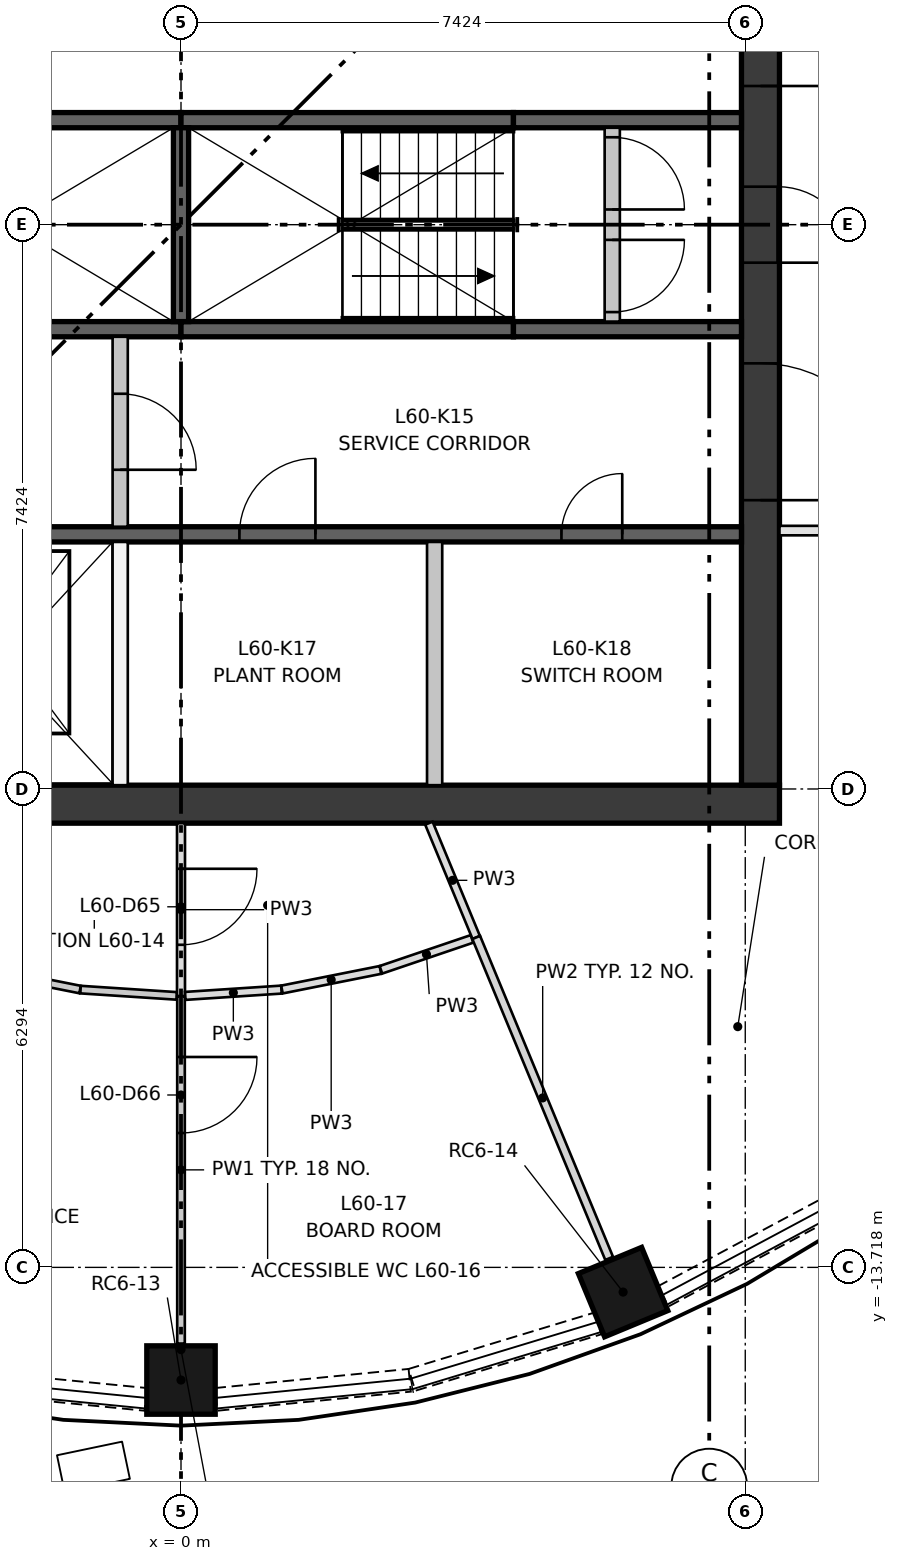
"""IFC4 building model, lengths in metres.
Left out: names, types, materials, properties, quantities, classifications, styles, units other than length and angle.
Written with IfcOpenShell. Run it as: python <this file> out.ifc"""

import sys

from ifc_helpers import new_model, si_unit, direction, frame, frame_2d, origin, origin_2d, place, context, subcontext, project, spatial, rectangle, extrude, element, fill, save


model = new_model("IFC4")
c1 = context("Model", 3, precision=1e-05, world=origin(), true_north=direction((0.0, 1.0)))
c2 = subcontext(c1, "Body", "Model", "MODEL_VIEW")
j1 = project(units=[si_unit("LENGTHUNIT", "METRE"), si_unit("PLANEANGLEUNIT", "RADIAN")], contexts=[c1])
p1 = place(None, origin())
s1 = spatial("IfcSite", under=j1, at=p1, CompositionType="ELEMENT")
p2 = place(p1, origin())
s2 = spatial("IfcBuilding", under=s1, at=p2, CompositionType="ELEMENT")
p3 = place(p2, frame((0.0, 0.0, 221.15)))
s3 = spatial("IfcBuildingStorey", under=s2, at=p3, CompositionType="ELEMENT", Elevation=221.15)
for number, where, z_axis, x_axis in (
    (1, (0.0, -15.2, 0.0), (0.0, 0.0, 1.0), (0.0, -1.0, 0.0)),
    (2, (5.817, -14.043, 0.0), (0.0, 0.0, 1.0), (0.383, -0.924, 0.0)),
):
    element("IfcColumn", number, at=place(p3, frame(where, z_axis=z_axis, x_axis=x_axis)), inside=s3, PredefinedType="COLUMN", context=c2, shape_type="SweptSolid", body=[
        extrude(rectangle(XDim=0.9, YDim=0.9, at=origin_2d()), origin(), (0.0, 0.0, 1.0), 2.85),
    ])
p4 = place(p3, frame((-7.874, -7.624, 0.0), z_axis=(0.0, 0.0, 1.0), x_axis=(1.0, 0.0, 0.0)))
e3 = element("IfcWall", 3, at=p4, inside=s3, PredefinedType="SHEAR", context=c2, shape_type="SweptSolid", body=[
    extrude(rectangle(XDim=15.748, YDim=0.5, at=frame_2d((7.874, 0.0))), origin(), (0.0, 0.0, 1.0), 3.35),
])
p5 = place(p3, frame((7.624, -7.374, 0.0), z_axis=(0.0, 0.0, 1.0), x_axis=(0.0, 1.0, 0.0)))
e4 = element("IfcWall", 4, at=p5, inside=s3, PredefinedType="SHEAR", context=c2, shape_type="SweptSolid", body=[
    extrude(rectangle(XDim=14.748, YDim=0.5, at=frame_2d((7.374, 0.0))), origin(), (0.0, 0.0, 1.0), 3.35),
])
p6 = place(p5, frame((6.874, 0.0, 0.0)))
e5 = element("IfcOpeningElement", 5, at=p6, cuts=e4, PredefinedType="OPENING", context=c2, shape_type="SweptSolid", body=[
    extrude(rectangle(XDim=1.0, YDim=2.1, at=frame_2d((0.5, 1.05))), frame((0.0, 0.26, 0.0), z_axis=(0.0, -1.0, 0.0), x_axis=(1.0, 0.0, 0.0)), (0.0, 0.0, 1.0), 0.52),
])
p7 = place(p5, frame((3.75, 0.0, 0.0)))
e6 = element("IfcOpeningElement", 6, at=p7, cuts=e4, PredefinedType="OPENING", context=c2, shape_type="SweptSolid", body=[
    extrude(rectangle(XDim=1.8, YDim=2.1, at=frame_2d((0.9, 1.05))), frame((0.0, 0.26, 0.0), z_axis=(0.0, -1.0, 0.0), x_axis=(1.0, 0.0, 0.0)), (0.0, 0.0, 1.0), 0.52),
])
p8 = place(p5, frame((9.198, 0.0, 0.0)))
e7 = element("IfcOpeningElement", 7, at=p8, cuts=e4, PredefinedType="OPENING", context=c2, shape_type="SweptSolid", body=[
    extrude(rectangle(XDim=1.8, YDim=2.1, at=frame_2d((0.9, 1.05))), frame((0.0, 0.26, 0.0), z_axis=(0.0, -1.0, 0.0), x_axis=(1.0, 0.0, 0.0)), (0.0, 0.0, 1.0), 0.52),
])
p9 = place(p3, frame((-7.374, -4.074, 0.0), z_axis=(0.0, 0.0, 1.0), x_axis=(1.0, 0.0, 0.0)))
e8 = element("IfcWall", 8, at=p9, inside=s3, PredefinedType="SHEAR", context=c2, shape_type="SweptSolid", body=[
    extrude(rectangle(XDim=14.748, YDim=0.2, at=frame_2d((7.374, 0.0))), origin(), (0.0, 0.0, 1.0), 3.0),
])
p10 = place(p9, frame((1.319, 0.0, 0.0)))
e9 = element("IfcOpeningElement", 9, at=p10, cuts=e8, PredefinedType="OPENING", context=c2, shape_type="SweptSolid", body=[
    extrude(rectangle(XDim=1.1, YDim=2.1, at=frame_2d((0.55, 1.05))), frame((0.0, 0.11, 0.0), z_axis=(0.0, -1.0, 0.0), x_axis=(1.0, 0.0, 0.0)), (0.0, 0.0, 1.0), 0.22),
])
p11 = place(p9, frame((4.456, 0.0, 0.0)))
e10 = element("IfcOpeningElement", 10, at=p11, cuts=e8, PredefinedType="OPENING", context=c2, shape_type="SweptSolid", body=[
    extrude(rectangle(XDim=1.1, YDim=2.1, at=frame_2d((0.55, 1.05))), frame((0.0, 0.11, 0.0), z_axis=(0.0, -1.0, 0.0), x_axis=(1.0, 0.0, 0.0)), (0.0, 0.0, 1.0), 0.22),
])
p12 = place(p9, frame((8.143, 0.0, 0.0)))
e11 = element("IfcOpeningElement", 11, at=p12, cuts=e8, PredefinedType="OPENING", context=c2, shape_type="SweptSolid", body=[
    extrude(rectangle(XDim=1.0, YDim=2.1, at=frame_2d((0.5, 1.05))), frame((0.0, 0.11, 0.0), z_axis=(0.0, -1.0, 0.0), x_axis=(1.0, 0.0, 0.0)), (0.0, 0.0, 1.0), 0.22),
])
p13 = place(p9, frame((12.379, 0.0, 0.0)))
e12 = element("IfcOpeningElement", 12, at=p13, cuts=e8, PredefinedType="OPENING", context=c2, shape_type="SweptSolid", body=[
    extrude(rectangle(XDim=0.8, YDim=2.1, at=frame_2d((0.4, 1.05))), frame((0.0, 0.11, 0.0), z_axis=(0.0, -1.0, 0.0), x_axis=(1.0, 0.0, 0.0)), (0.0, 0.0, 1.0), 0.22),
])
for number, where, z_axis, x_axis in (
    (13, (-4.374, -1.375, 0.0), (0.0, 0.0, 1.0), (1.0, 0.0, 0.0)),
    (14, (0.0, -1.375, 0.0), (0.0, 0.0, 1.0), (1.0, 0.0, 0.0)),
):
    element("IfcWall", number, at=place(p3, frame(where, z_axis=z_axis, x_axis=x_axis)), inside=s3, PredefinedType="SHEAR", context=c2, shape_type="SweptSolid", body=[
        extrude(rectangle(XDim=4.374, YDim=0.2, at=frame_2d((2.187, 0.0))), origin(), (0.0, 0.0, 1.0), 3.0),
    ])
p14 = place(p3, frame((4.374, -1.375, 0.0), z_axis=(0.0, 0.0, 1.0), x_axis=(1.0, 0.0, 0.0)))
e15 = element("IfcWall", 15, at=p14, inside=s3, PredefinedType="SHEAR", context=c2, shape_type="SweptSolid", body=[
    extrude(rectangle(XDim=3.0, YDim=0.2, at=frame_2d((1.5, 0.0))), origin(), (0.0, 0.0, 1.0), 3.0),
])
for number, where, z_axis, x_axis in (
    (16, (-4.374, 1.375, 0.0), (0.0, 0.0, 1.0), (1.0, 0.0, 0.0)),
    (17, (0.0, 1.375, 0.0), (0.0, 0.0, 1.0), (1.0, 0.0, 0.0)),
):
    element("IfcWall", number, at=place(p3, frame(where, z_axis=z_axis, x_axis=x_axis)), inside=s3, PredefinedType="SHEAR", context=c2, shape_type="SweptSolid", body=[
        extrude(rectangle(XDim=4.374, YDim=0.2, at=frame_2d((2.187, 0.0))), origin(), (0.0, 0.0, 1.0), 3.0),
    ])
p15 = place(p3, frame((4.374, 1.375, 0.0), z_axis=(0.0, 0.0, 1.0), x_axis=(1.0, 0.0, 0.0)))
e18 = element("IfcWall", 18, at=p15, inside=s3, PredefinedType="SHEAR", context=c2, shape_type="SweptSolid", body=[
    extrude(rectangle(XDim=3.0, YDim=0.2, at=frame_2d((1.5, 0.0))), origin(), (0.0, 0.0, 1.0), 3.0),
])
p16 = place(p3, frame((0.0, -1.275, 0.0), z_axis=(0.0, 0.0, 1.0), x_axis=(0.0, 1.0, 0.0)))
e19 = element("IfcWall", 19, at=p16, inside=s3, PredefinedType="SHEAR", context=c2, shape_type="SweptSolid", body=[
    extrude(rectangle(XDim=2.55, YDim=0.2, at=frame_2d((1.275, 0.0))), origin(), (0.0, 0.0, 1.0), 3.0),
])
p17 = place(p3, frame((-0.8, -7.374, 0.0), z_axis=(0.0, 0.0, 1.0), x_axis=(0.0, 1.0, 0.0)))
e20 = element("IfcWall", 20, at=p17, inside=s3, PredefinedType="PARTITIONING", context=c2, shape_type="SweptSolid", body=[
    extrude(rectangle(XDim=3.2, YDim=0.2, at=frame_2d((1.6, 0.0))), origin(), (0.0, 0.0, 1.0), 3.0),
])
p18 = place(p3, frame((-0.8, -3.974, 0.0), z_axis=(0.0, 0.0, 1.0), x_axis=(0.0, 1.0, 0.0)))
e21 = element("IfcWall", 21, at=p18, inside=s3, PredefinedType="PARTITIONING", context=c2, shape_type="SweptSolid", body=[
    extrude(rectangle(XDim=2.499, YDim=0.2, at=frame_2d((1.25, 0.0))), origin(), (0.0, 0.0, 1.0), 3.0),
])
p19 = place(p18, frame((0.75, 0.0, 0.0)))
e22 = element("IfcOpeningElement", 22, at=p19, cuts=e21, PredefinedType="OPENING", context=c2, shape_type="SweptSolid", body=[
    extrude(rectangle(XDim=1.0, YDim=2.1, at=frame_2d((0.5, 1.05))), frame((0.0, 0.11, 0.0), z_axis=(0.0, -1.0, 0.0), x_axis=(1.0, 0.0, 0.0)), (0.0, 0.0, 1.0), 0.22),
])
p20 = place(p3, frame((3.337, -7.374, 0.0), z_axis=(0.0, 0.0, 1.0), x_axis=(0.0, 1.0, 0.0)))
e23 = element("IfcWall", 23, at=p20, inside=s3, PredefinedType="PARTITIONING", context=c2, shape_type="SweptSolid", body=[
    extrude(rectangle(XDim=3.2, YDim=0.2, at=frame_2d((1.6, 0.0))), origin(), (0.0, 0.0, 1.0), 3.0),
])
p21 = place(p3, frame((5.674, -1.275, 0.0), z_axis=(0.0, 0.0, 1.0), x_axis=(0.0, 1.0, 0.0)))
e24 = element("IfcWall", 24, at=p21, inside=s3, PredefinedType="PARTITIONING", context=c2, shape_type="SweptSolid", body=[
    extrude(rectangle(XDim=2.55, YDim=0.2, at=frame_2d((1.275, 0.0))), origin(), (0.0, 0.0, 1.0), 3.0),
])
p22 = place(p21, frame((0.125, 0.0, 0.0)))
e25 = element("IfcOpeningElement", 25, at=p22, cuts=e24, PredefinedType="OPENING", context=c2, shape_type="SweptSolid", body=[
    extrude(rectangle(XDim=0.95, YDim=2.1, at=frame_2d((0.475, 1.05))), frame((0.0, 0.11, 0.0), z_axis=(0.0, -1.0, 0.0), x_axis=(1.0, 0.0, 0.0)), (0.0, 0.0, 1.0), 0.22),
])
p23 = place(p21, frame((1.475, 0.0, 0.0)))
e26 = element("IfcOpeningElement", 26, at=p23, cuts=e24, PredefinedType="OPENING", context=c2, shape_type="SweptSolid", body=[
    extrude(rectangle(XDim=0.95, YDim=2.1, at=frame_2d((0.475, 1.05))), frame((0.0, 0.11, 0.0), z_axis=(0.0, -1.0, 0.0), x_axis=(1.0, 0.0, 0.0)), (0.0, 0.0, 1.0), 0.22),
])
for number, where, z_axis, x_axis in (
    (27, (-3.009, -15.204, 0.0), (0.0, 0.0, 1.0), (0.995, -0.098, 0.0)),
    (28, (0.464, -15.455, 0.0), (0.0, 0.0, 1.0), (0.995, 0.098, 0.0)),
):
    element("IfcWall", number, at=place(p3, frame(where, z_axis=z_axis, x_axis=x_axis)), inside=s3, PredefinedType="SOLIDWALL", context=c2, shape_type="SweptSolid", body=[
        extrude(rectangle(XDim=2.558, YDim=0.3, at=frame_2d((1.279, 0.0))), origin(), (0.0, 0.0, 1.0), 0.9),
    ])
p24 = place(p3, frame((3.038, -15.198, 0.0), z_axis=(0.0, 0.0, 1.0), x_axis=(0.956960147557, 0.290219358397, 0.0)))
e29 = element("IfcWall", 29, at=p24, inside=s3, PredefinedType="SOLIDWALL", context=c2, shape_type="SweptSolid", body=[
    extrude(rectangle(XDim=2.557, YDim=0.3, at=frame_2d((1.279, 0.0))), origin(), (0.0, 0.0, 1.0), 0.9),
])
p25 = place(p3, frame((6.343, -14.1, 0.0), z_axis=(0.0, 0.0, 1.0), x_axis=(0.881810499649, 0.471603904468, 0.0)))
e30 = element("IfcWall", 30, at=p25, inside=s3, PredefinedType="SOLIDWALL", context=c2, shape_type="SweptSolid", body=[
    extrude(rectangle(XDim=2.557, YDim=0.3, at=frame_2d((1.278, 0.0))), origin(), (0.0, 0.0, 1.0), 0.9),
])
p26 = place(p3, frame((10.191, -4.024, 0.0), z_axis=(0.0, 0.0, 1.0), x_axis=(-1.0, 0.0, 0.0)))
e31 = element("IfcWall", 31, at=p26, inside=s3, PredefinedType="PARTITIONING", context=c2, shape_type="SweptSolid", body=[
    extrude(rectangle(XDim=2.317, YDim=0.125, at=frame_2d((1.158, 0.0))), origin(), (0.0, 0.0, 1.0), 3.0),
])
p27 = place(p26, frame((0.7, 0.0, 0.0)))
e32 = element("IfcOpeningElement", 32, at=p27, cuts=e31, PredefinedType="OPENING", context=c2, shape_type="SweptSolid", body=[
    extrude(rectangle(XDim=1.0, YDim=2.1, at=frame_2d((0.5, 1.05))), frame((0.0, 0.073, 0.0), z_axis=(0.0, -1.0, 0.0), x_axis=(1.0, 0.0, 0.0)), (0.0, 0.0, 1.0), 0.145),
])
p28 = place(p3, frame((-1.328, -10.062, 0.0), z_axis=(0.0, 0.0, 1.0), x_axis=(-0.980779158075, 0.195121098517, 0.0)))
e33 = element("IfcWall", 33, at=p28, inside=s3, PredefinedType="PARTITIONING", context=c2, shape_type="SweptSolid", body=[
    extrude(rectangle(XDim=1.321, YDim=0.1, at=frame_2d((0.661, 0.0))), origin(), (0.0, 0.0, 1.0), 3.0),
])
p29 = place(p3, frame((-0.056, -10.146, 0.0), z_axis=(0.0, 0.0, 1.0), x_axis=(-0.997868677089, 0.065254143814, 0.0)))
e34 = element("IfcWall", 34, at=p29, inside=s3, PredefinedType="PARTITIONING", context=c2, shape_type="SweptSolid", body=[
    extrude(rectangle(XDim=1.268, YDim=0.1, at=frame_2d((0.634, 0.0))), origin(), (0.0, 0.0, 1.0), 3.0),
])
p30 = place(p3, frame((0.0, -7.874, 0.0), z_axis=(0.0, 0.0, 1.0), x_axis=(0.0, -1.0, 0.0)))
e35 = element("IfcWall", 35, at=p30, inside=s3, PredefinedType="PARTITIONING", context=c2, shape_type="SweptSolid", body=[
    extrude(rectangle(XDim=2.276, YDim=0.105, at=frame_2d((1.138, 0.0))), origin(), (0.0, 0.0, 1.0), 3.0),
])
p31 = place(p30, frame((0.6, 0.0, 0.0)))
e36 = element("IfcOpeningElement", 36, at=p31, cuts=e35, PredefinedType="OPENING", context=c2, shape_type="SweptSolid", body=[
    extrude(rectangle(XDim=1.0, YDim=2.1, at=frame_2d((0.5, 1.05))), frame((0.0, 0.062, 0.0), z_axis=(0.0, -1.0, 0.0), x_axis=(1.0, 0.0, 0.0)), (0.0, 0.0, 1.0), 0.125),
])
p32 = place(p3, frame((0.0, -10.15, 0.0), z_axis=(0.0, 0.0, 1.0), x_axis=(0.0, -1.0, 0.0)))
e37 = element("IfcWall", 37, at=p32, inside=s3, PredefinedType="PARTITIONING", context=c2, shape_type="SweptSolid", body=[
    extrude(rectangle(XDim=4.57, YDim=0.1, at=frame_2d((2.285, 0.0))), origin(), (0.0, 0.0, 1.0), 3.0),
])
p33 = place(p32, frame((0.8, 0.0, 0.0)))
e38 = element("IfcOpeningElement", 38, at=p33, cuts=e37, PredefinedType="OPENING", context=c2, shape_type="SweptSolid", body=[
    extrude(rectangle(XDim=1.0, YDim=2.1, at=frame_2d((0.5, 1.05))), frame((0.0, 0.06, 0.0), z_axis=(0.0, -1.0, 0.0), x_axis=(1.0, 0.0, 0.0)), (0.0, 0.0, 1.0), 0.12),
])
p34 = place(p3, frame((1.321, -10.063, 0.0), z_axis=(0.0, 0.0, 1.0), x_axis=(-0.99786785721, -0.065266680223, 0.0)))
e39 = element("IfcWall", 39, at=p34, inside=s3, PredefinedType="PARTITIONING", context=c2, shape_type="SweptSolid", body=[
    extrude(rectangle(XDim=1.268, YDim=0.105, at=frame_2d((0.634, 0.0))), origin(), (0.0, 0.0, 1.0), 3.0),
])
p35 = place(p3, frame((2.624, -9.805, 0.0), z_axis=(0.0, 0.0, 1.0), x_axis=(-0.980765080918, -0.195191844223, 0.0)))
e40 = element("IfcWall", 40, at=p35, inside=s3, PredefinedType="PARTITIONING", context=c2, shape_type="SweptSolid", body=[
    extrude(rectangle(XDim=1.321, YDim=0.105, at=frame_2d((0.66, 0.0))), origin(), (0.0, 0.0, 1.0), 3.0),
])
p36 = place(p3, frame((3.829, -9.396, 0.0), z_axis=(0.0, 0.0, 1.0), x_axis=(-0.946932566751, -0.321432285291, 0.0)))
e41 = element("IfcWall", 41, at=p36, inside=s3, PredefinedType="PARTITIONING", context=c2, shape_type="SweptSolid", body=[
    extrude(rectangle(XDim=1.265, YDim=0.105, at=frame_2d((0.633, 0.0))), origin(), (0.0, 0.0, 1.0), 3.0),
])
p37 = place(p3, frame((3.261, -7.874, 0.0), z_axis=(0.0, 0.0, 1.0), x_axis=(0.382718376354, -0.923865057463, 0.0)))
e42 = element("IfcWall", 42, at=p37, inside=s3, PredefinedType="PARTITIONING", context=c2, shape_type="SweptSolid", body=[
    extrude(rectangle(XDim=1.627, YDim=0.105, at=frame_2d((0.813, 0.0))), origin(), (0.0, 0.0, 1.0), 3.0),
])
p38 = place(p3, frame((3.884, -9.377, 0.0), z_axis=(0.0, 0.0, 1.0), x_axis=(0.382664766489, -0.923887263949, 0.0)))
e43 = element("IfcWall", 43, at=p38, inside=s3, PredefinedType="PARTITIONING", context=c2, shape_type="SweptSolid", body=[
    extrude(rectangle(XDim=4.57, YDim=0.11, at=frame_2d((2.285, 0.0))), origin(), (0.0, 0.0, 1.0), 3.0),
])
p39 = place(p22, frame((0.95, 0.0, 0.0), z_axis=(0.0, 0.0, 1.0), x_axis=(-1.0, 0.0, 0.0)))
e44 = element("IfcDoor", 44, at=p39, inside=s3, OperationType="SINGLE_SWING_RIGHT", PredefinedType="DOOR", context=c2, shape_type="SweptSolid", body=[
    extrude(rectangle(XDim=0.95, YDim=2.1, at=frame_2d((0.475, 1.05))), frame((0.0, 0.025, 0.0), z_axis=(0.0, -1.0, 0.0), x_axis=(1.0, 0.0, 0.0)), (0.0, 0.0, 1.0), 0.05),
])
fill(e25, e44)
p40 = place(p23, frame((0.95, 0.0, 0.0), z_axis=(0.0, 0.0, 1.0), x_axis=(-1.0, 0.0, 0.0)))
e45 = element("IfcDoor", 45, at=p40, inside=s3, OperationType="SINGLE_SWING_LEFT", PredefinedType="DOOR", context=c2, shape_type="SweptSolid", body=[
    extrude(rectangle(XDim=0.95, YDim=2.1, at=frame_2d((0.475, 1.05))), frame((0.0, 0.025, 0.0), z_axis=(0.0, -1.0, 0.0), x_axis=(1.0, 0.0, 0.0)), (0.0, 0.0, 1.0), 0.05),
])
fill(e26, e45)
p41 = place(p19, frame((1.0, 0.0, 0.0), z_axis=(0.0, 0.0, 1.0), x_axis=(-1.0, 0.0, 0.0)))
e46 = element("IfcDoor", 46, at=p41, inside=s3, OperationType="SINGLE_SWING_LEFT", PredefinedType="DOOR", context=c2, shape_type="SweptSolid", body=[
    extrude(rectangle(XDim=1.0, YDim=2.1, at=frame_2d((0.5, 1.05))), frame((0.0, 0.025, 0.0), z_axis=(0.0, -1.0, 0.0), x_axis=(1.0, 0.0, 0.0)), (0.0, 0.0, 1.0), 0.05),
])
fill(e22, e46)
p42 = place(p12, origin())
e47 = element("IfcDoor", 47, at=p42, inside=s3, OperationType="SINGLE_SWING_RIGHT", PredefinedType="DOOR", context=c2, shape_type="SweptSolid", body=[
    extrude(rectangle(XDim=1.0, YDim=2.1, at=frame_2d((0.5, 1.05))), frame((0.0, 0.025, 0.0), z_axis=(0.0, -1.0, 0.0), x_axis=(1.0, 0.0, 0.0)), (0.0, 0.0, 1.0), 0.05),
])
fill(e11, e47)
p43 = place(p13, origin())
e48 = element("IfcDoor", 48, at=p43, inside=s3, OperationType="SINGLE_SWING_RIGHT", PredefinedType="DOOR", context=c2, shape_type="SweptSolid", body=[
    extrude(rectangle(XDim=0.8, YDim=2.1, at=frame_2d((0.4, 1.05))), frame((0.0, 0.025, 0.0), z_axis=(0.0, -1.0, 0.0), x_axis=(1.0, 0.0, 0.0)), (0.0, 0.0, 1.0), 0.05),
])
fill(e12, e48)
p44 = place(p6, frame((1.0, 0.0, 0.0), z_axis=(0.0, 0.0, 1.0), x_axis=(-1.0, 0.0, 0.0)))
e49 = element("IfcDoor", 49, at=p44, inside=s3, OperationType="SINGLE_SWING_LEFT", PredefinedType="DOOR", context=c2, shape_type="SweptSolid", body=[
    extrude(rectangle(XDim=1.0, YDim=2.1, at=frame_2d((0.5, 1.05))), frame((0.0, 0.25, 0.0), z_axis=(0.0, -1.0, 0.0), x_axis=(1.0, 0.0, 0.0)), (0.0, 0.0, 1.0), 0.05),
])
fill(e5, e49)
p45 = place(p7, frame((1.8, 0.0, 0.0), z_axis=(0.0, 0.0, 1.0), x_axis=(-1.0, 0.0, 0.0)))
e50 = element("IfcDoor", 50, at=p45, inside=s3, OperationType="DOUBLE_DOOR_SINGLE_SWING", PredefinedType="DOOR", context=c2, shape_type="SweptSolid", body=[
    extrude(rectangle(XDim=1.8, YDim=2.1, at=frame_2d((0.9, 1.05))), frame((0.0, 0.025, 0.0), z_axis=(0.0, -1.0, 0.0), x_axis=(1.0, 0.0, 0.0)), (0.0, 0.0, 1.0), 0.05),
])
fill(e6, e50)
p46 = place(p8, frame((1.8, 0.0, 0.0), z_axis=(0.0, 0.0, 1.0), x_axis=(-1.0, 0.0, 0.0)))
e51 = element("IfcDoor", 51, at=p46, inside=s3, OperationType="DOUBLE_DOOR_SINGLE_SWING", PredefinedType="DOOR", context=c2, shape_type="SweptSolid", body=[
    extrude(rectangle(XDim=1.8, YDim=2.1, at=frame_2d((0.9, 1.05))), frame((0.0, 0.025, 0.0), z_axis=(0.0, -1.0, 0.0), x_axis=(1.0, 0.0, 0.0)), (0.0, 0.0, 1.0), 0.05),
])
fill(e7, e51)
p47 = place(p31, origin())
e52 = element("IfcDoor", 52, at=p47, inside=s3, OperationType="SINGLE_SWING_LEFT", PredefinedType="DOOR", context=c2, shape_type="SweptSolid", body=[
    extrude(rectangle(XDim=1.0, YDim=2.1, at=frame_2d((0.5, 1.05))), frame((0.0, 0.025, 0.0), z_axis=(0.0, -1.0, 0.0), x_axis=(1.0, 0.0, 0.0)), (0.0, 0.0, 1.0), 0.05),
])
fill(e36, e52)
p48 = place(p33, origin())
e53 = element("IfcDoor", 53, at=p48, inside=s3, OperationType="SINGLE_SWING_LEFT", PredefinedType="DOOR", context=c2, shape_type="SweptSolid", body=[
    extrude(rectangle(XDim=1.0, YDim=2.1, at=frame_2d((0.5, 1.05))), frame((0.0, 0.025, 0.0), z_axis=(0.0, -1.0, 0.0), x_axis=(1.0, 0.0, 0.0)), (0.0, 0.0, 1.0), 0.05),
])
fill(e38, e53)
save(model, sys.argv[1])
